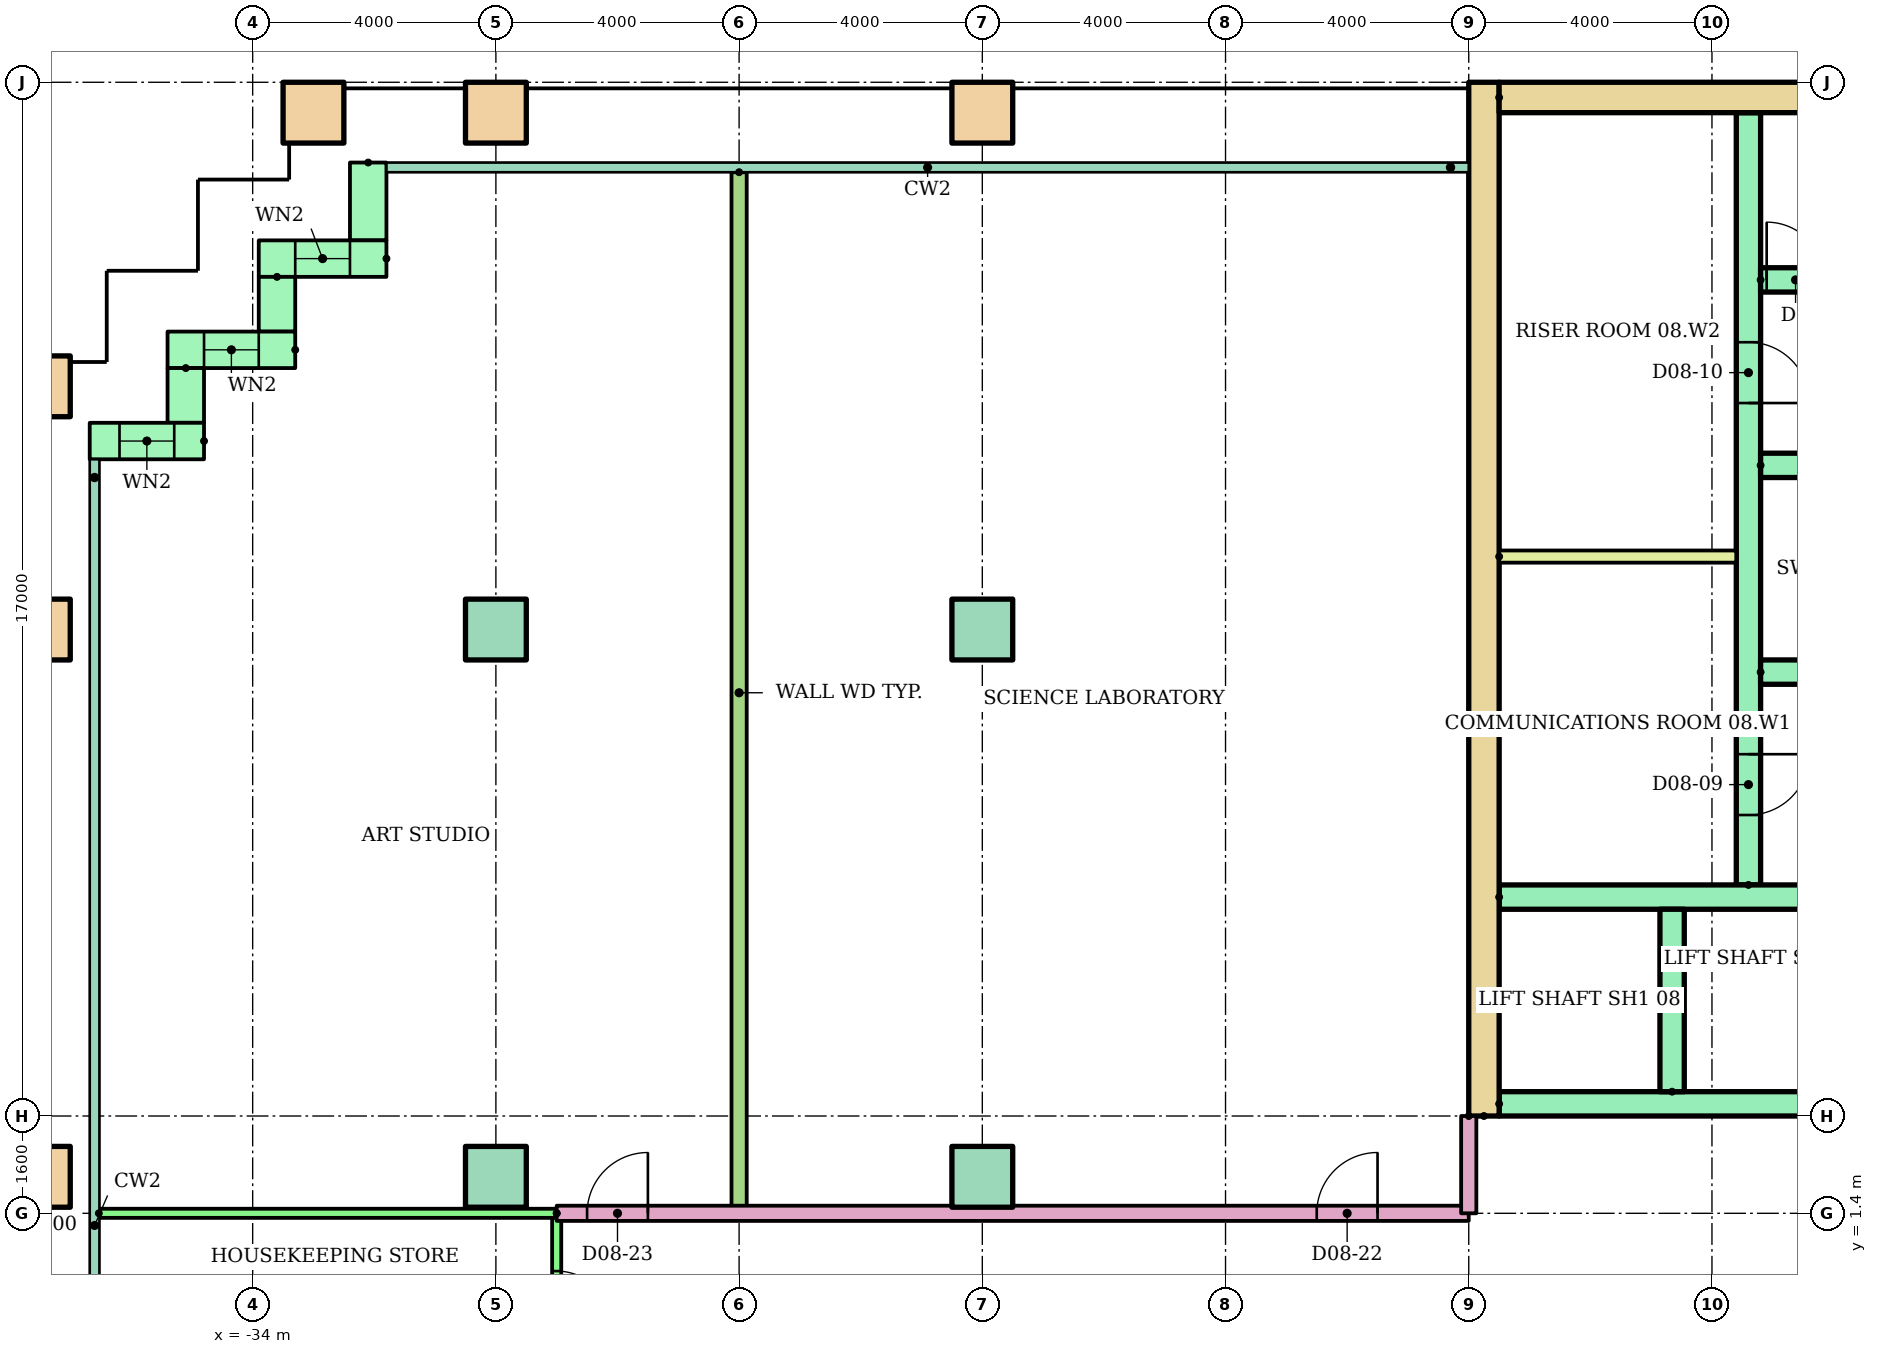
"""IFC4 building model, lengths in metres.
Left out: names, types, materials, properties, quantities, classifications, styles, units other than length and angle.
Written with IfcOpenShell. Run it as: python <this file> out.ifc"""

import sys

from ifc_helpers import new_model, si_unit, direction, frame, frame_2d, origin, origin_2d, place, context, subcontext, project, spatial, rectangle, hollow_rectangle, extrude, element, fill, save


model = new_model("IFC4")
c1 = context("Model", 3, precision=1e-05, world=origin(), true_north=direction((0.0, 1.0)))
c2 = subcontext(c1, "Body", "Model", "MODEL_VIEW")
j1 = project(units=[si_unit("LENGTHUNIT", "METRE"), si_unit("PLANEANGLEUNIT", "RADIAN")], contexts=[c1])
p1 = place(None, origin())
s1 = spatial("IfcSite", under=j1, at=p1, CompositionType="ELEMENT")
p2 = place(p1, origin())
s2 = spatial("IfcBuilding", under=s1, at=p2, CompositionType="ELEMENT")
p3 = place(p2, frame((0.0, 0.0, 33.8)))
s3 = spatial("IfcBuildingStorey", under=s2, at=p3, CompositionType="ELEMENT", Elevation=33.8)
p4 = place(p3, frame((-37.5, 2.0, 0.0)))
e1 = element("IfcColumn", 1, at=p4, inside=s3, PredefinedType="COLUMN", context=c2, shape_type="SweptSolid", body=[
    extrude(hollow_rectangle(XDim=1.0, YDim=1.0, WallThickness=0.05, at=origin_2d()), origin(), (0.0, 0.0, 1.0), 3.9),
])
for number, where in (
    (2, (-30.0, 2.0, 0.0)),
    (3, (-22.0, 2.0, 0.0)),
):
    element("IfcColumn", number, at=place(p3, frame(where)), inside=s3, PredefinedType="COLUMN", context=c2, shape_type="SweptSolid", body=[
        extrude(rectangle(XDim=1.0, YDim=1.0, at=origin_2d()), origin(), (0.0, 0.0, 1.0), 3.9),
    ])
p5 = place(p3, frame((-37.5, 11.0, 0.0)))
e4 = element("IfcColumn", 4, at=p5, inside=s3, PredefinedType="COLUMN", context=c2, shape_type="SweptSolid", body=[
    extrude(hollow_rectangle(XDim=1.0, YDim=1.0, WallThickness=0.05, at=origin_2d()), origin(), (0.0, 0.0, 1.0), 3.9),
])
for number, where in (
    (5, (-30.0, 11.0, 0.0)),
    (6, (-22.0, 11.0, 0.0)),
):
    element("IfcColumn", number, at=place(p3, frame(where)), inside=s3, PredefinedType="COLUMN", context=c2, shape_type="SweptSolid", body=[
        extrude(rectangle(XDim=1.0, YDim=1.0, at=origin_2d()), origin(), (0.0, 0.0, 1.0), 3.9),
    ])
for number, where in (
    (7, (-37.5, 15.0, 0.0)),
    (8, (-33.0, 19.5, 0.0)),
    (9, (-30.0, 19.5, 0.0)),
    (10, (-22.0, 19.5, 0.0)),
):
    element("IfcColumn", number, at=place(p3, frame(where)), inside=s3, PredefinedType="COLUMN", context=c2, shape_type="SweptSolid", body=[
        extrude(hollow_rectangle(XDim=1.0, YDim=1.0, WallThickness=0.05, at=origin_2d()), origin(), (0.0, 0.0, 1.0), 3.9),
    ])
p6 = place(p3, frame((-32.1, 18.68, 0.0), z_axis=(0.0, 0.0, 1.0), x_axis=(0.0, -1.0, 0.0)))
e11 = element("IfcWall", 11, at=p6, inside=s3, PredefinedType="STANDARD", context=c2, shape_type="SweptSolid", body=[
    extrude(rectangle(XDim=1.28, YDim=0.6, at=frame_2d((0.64, 0.0))), origin(), (0.0, 0.0, 1.0), 3.6),
])
p7 = place(p3, frame((-31.8, 17.1, 0.0), z_axis=(0.0, 0.0, 1.0), x_axis=(-1.0, 0.0, 0.0)))
e12 = element("IfcWall", 12, at=p7, inside=s3, PredefinedType="STANDARD", context=c2, shape_type="SweptSolid", body=[
    extrude(rectangle(XDim=2.1, YDim=0.6, at=frame_2d((1.05, 0.0))), origin(), (0.0, 0.0, 1.0), 3.6),
])
p8 = place(p7, frame((0.6, 0.0, 0.9)))
e13 = element("IfcOpeningElement", 13, at=p8, cuts=e12, PredefinedType="OPENING", context=c2, shape_type="SweptSolid", body=[
    extrude(rectangle(XDim=0.9, YDim=1.8, at=frame_2d((0.45, 0.9))), frame((0.0, 0.31, 0.0), z_axis=(0.0, -1.0, 0.0), x_axis=(1.0, 0.0, 0.0)), (0.0, 0.0, 1.0), 0.62),
])
p9 = place(p3, frame((-33.6, 16.8, 0.0), z_axis=(0.0, 0.0, 1.0), x_axis=(0.0, -1.0, 0.0)))
e14 = element("IfcWall", 14, at=p9, inside=s3, PredefinedType="STANDARD", context=c2, shape_type="SweptSolid", body=[
    extrude(rectangle(XDim=0.9, YDim=0.6, at=frame_2d((0.45, 0.0))), origin(), (0.0, 0.0, 1.0), 3.6),
])
p10 = place(p3, frame((-33.3, 15.6, 0.0), z_axis=(0.0, 0.0, 1.0), x_axis=(-1.0, 0.0, 0.0)))
e15 = element("IfcWall", 15, at=p10, inside=s3, PredefinedType="STANDARD", context=c2, shape_type="SweptSolid", body=[
    extrude(rectangle(XDim=2.1, YDim=0.6, at=frame_2d((1.05, 0.0))), origin(), (0.0, 0.0, 1.0), 3.6),
])
p11 = place(p10, frame((0.6, 0.0, 0.9)))
e16 = element("IfcOpeningElement", 16, at=p11, cuts=e15, PredefinedType="OPENING", context=c2, shape_type="SweptSolid", body=[
    extrude(rectangle(XDim=0.9, YDim=1.8, at=frame_2d((0.45, 0.9))), frame((0.0, 0.31, 0.0), z_axis=(0.0, -1.0, 0.0), x_axis=(1.0, 0.0, 0.0)), (0.0, 0.0, 1.0), 0.62),
])
p12 = place(p3, frame((-35.1, 15.3, 0.0), z_axis=(0.0, 0.0, 1.0), x_axis=(0.0, -1.0, 0.0)))
e17 = element("IfcWall", 17, at=p12, inside=s3, PredefinedType="STANDARD", context=c2, shape_type="SweptSolid", body=[
    extrude(rectangle(XDim=0.9, YDim=0.6, at=frame_2d((0.45, 0.0))), origin(), (0.0, 0.0, 1.0), 3.6),
])
p13 = place(p3, frame((-34.8, 14.1, 0.0), z_axis=(0.0, 0.0, 1.0), x_axis=(-1.0, 0.0, 0.0)))
e18 = element("IfcWall", 18, at=p13, inside=s3, PredefinedType="STANDARD", context=c2, shape_type="SweptSolid", body=[
    extrude(rectangle(XDim=1.88, YDim=0.6, at=frame_2d((0.94, 0.0))), origin(), (0.0, 0.0, 1.0), 3.6),
])
p14 = place(p13, frame((0.49, 0.0, 0.9)))
e19 = element("IfcOpeningElement", 19, at=p14, cuts=e18, PredefinedType="OPENING", context=c2, shape_type="SweptSolid", body=[
    extrude(rectangle(XDim=0.9, YDim=1.8, at=frame_2d((0.45, 0.9))), frame((0.0, 0.31, 0.0), z_axis=(0.0, -1.0, 0.0), x_axis=(1.0, 0.0, 0.0)), (0.0, 0.0, 1.0), 0.62),
])
p15 = place(p3, frame((-13.75, 3.0, 0.0), z_axis=(0.0, 0.0, 1.0), x_axis=(0.0, 1.0, 0.0)))
e20 = element("IfcWall", 20, at=p15, inside=s3, PredefinedType="SHEAR", context=c2, shape_type="SweptSolid", body=[
    extrude(rectangle(XDim=17.0, YDim=0.5, at=frame_2d((8.5, 0.0))), origin(), (0.0, 0.0, 1.0), 3.6),
])
p16 = place(p3, frame((-13.5, 19.75, 0.0)))
e21 = element("IfcWall", 21, at=p16, inside=s3, PredefinedType="SHEAR", context=c2, shape_type="SweptSolid", body=[
    extrude(rectangle(XDim=27.0, YDim=0.5, at=frame_2d((13.5, 0.0))), origin(), (0.0, 0.0, 1.0), 3.6),
])
p17 = place(p3, frame((-9.4, 6.8, 0.0), z_axis=(0.0, 0.0, 1.0), x_axis=(0.0, 1.0, 0.0)))
e22 = element("IfcWall", 22, at=p17, inside=s3, PredefinedType="SHEAR", context=c2, shape_type="SweptSolid", body=[
    extrude(rectangle(XDim=12.7, YDim=0.4, at=frame_2d((6.35, 0.0))), origin(), (0.0, 0.0, 1.0), 3.6),
])
p18 = place(p17, frame((1.15, 0.0, 0.0)))
e23 = element("IfcOpeningElement", 23, at=p18, cuts=e22, PredefinedType="OPENING", context=c2, shape_type="SweptSolid", body=[
    extrude(rectangle(XDim=1.0, YDim=2.1, at=frame_2d((0.5, 1.05))), frame((0.0, 0.21, 0.0), z_axis=(0.0, -1.0, 0.0), x_axis=(1.0, 0.0, 0.0)), (0.0, 0.0, 1.0), 0.42),
])
p19 = place(p17, frame((7.925, 0.0, 0.0)))
e24 = element("IfcOpeningElement", 24, at=p19, cuts=e22, PredefinedType="OPENING", context=c2, shape_type="SweptSolid", body=[
    extrude(rectangle(XDim=1.0, YDim=2.1, at=frame_2d((0.5, 1.05))), frame((0.0, 0.21, 0.0), z_axis=(0.0, -1.0, 0.0), x_axis=(1.0, 0.0, 0.0)), (0.0, 0.0, 1.0), 0.42),
])
p20 = place(p3, frame((-13.5, 3.2, 0.0)))
e25 = element("IfcWall", 25, at=p20, inside=s3, PredefinedType="SHEAR", context=c2, shape_type="SweptSolid", body=[
    extrude(rectangle(XDim=27.0, YDim=0.4, at=frame_2d((13.5, 0.0))), origin(), (0.0, 0.0, 1.0), 3.6),
])
p21 = place(p20, frame((6.861, 0.0, 0.0)))
e26 = element("IfcOpeningElement", 26, at=p21, cuts=e25, PredefinedType="OPENING", context=c2, shape_type="SweptSolid", body=[
    extrude(rectangle(XDim=1.1, YDim=2.1, at=frame_2d((0.55, 1.05))), frame((0.0, 0.21, 0.0), z_axis=(0.0, -1.0, 0.0), x_axis=(1.0, 0.0, 0.0)), (0.0, 0.0, 1.0), 0.42),
])
p22 = place(p20, frame((9.906, 0.0, 0.0)))
e27 = element("IfcOpeningElement", 27, at=p22, cuts=e25, PredefinedType="OPENING", context=c2, shape_type="SweptSolid", body=[
    extrude(rectangle(XDim=1.1, YDim=2.1, at=frame_2d((0.55, 1.05))), frame((0.0, 0.21, 0.0), z_axis=(0.0, -1.0, 0.0), x_axis=(1.0, 0.0, 0.0)), (0.0, 0.0, 1.0), 0.42),
])
p23 = place(p20, frame((15.994, 0.0, 0.0)))
e28 = element("IfcOpeningElement", 28, at=p23, cuts=e25, PredefinedType="OPENING", context=c2, shape_type="SweptSolid", body=[
    extrude(rectangle(XDim=1.1, YDim=2.1, at=frame_2d((0.55, 1.05))), frame((0.0, 0.21, 0.0), z_axis=(0.0, -1.0, 0.0), x_axis=(1.0, 0.0, 0.0)), (0.0, 0.0, 1.0), 0.42),
])
p24 = place(p20, frame((19.039, 0.0, 0.0)))
e29 = element("IfcOpeningElement", 29, at=p24, cuts=e25, PredefinedType="OPENING", context=c2, shape_type="SweptSolid", body=[
    extrude(rectangle(XDim=1.1, YDim=2.1, at=frame_2d((0.55, 1.05))), frame((0.0, 0.21, 0.0), z_axis=(0.0, -1.0, 0.0), x_axis=(1.0, 0.0, 0.0)), (0.0, 0.0, 1.0), 0.42),
])
p25 = place(p20, frame((12.6, 0.0, 0.0)))
e30 = element("IfcOpeningElement", 30, at=p25, cuts=e25, PredefinedType="OPENING", context=c2, shape_type="SweptSolid", body=[
    extrude(rectangle(XDim=1.8, YDim=2.1, at=frame_2d((0.9, 1.05))), frame((0.0, 0.21, 0.0), z_axis=(0.0, -1.0, 0.0), x_axis=(1.0, 0.0, 0.0)), (0.0, 0.0, 1.0), 0.42),
])
p26 = place(p3, frame((-13.5, 6.6, 0.0)))
e31 = element("IfcWall", 31, at=p26, inside=s3, PredefinedType="SHEAR", context=c2, shape_type="SweptSolid", body=[
    extrude(rectangle(XDim=11.978, YDim=0.4, at=frame_2d((5.989, 0.0))), origin(), (0.0, 0.0, 1.0), 3.6),
])
p27 = place(p3, frame((-10.656, 3.4, 0.0), z_axis=(0.0, 0.0, 1.0), x_axis=(0.0, 1.0, 0.0)))
e32 = element("IfcWall", 32, at=p27, inside=s3, PredefinedType="SHEAR", context=c2, shape_type="SweptSolid", body=[
    extrude(rectangle(XDim=3.0, YDim=0.4, at=frame_2d((1.5, 0.0))), origin(), (0.0, 0.0, 1.0), 3.6),
])
p28 = place(p3, frame((-9.2, 10.3, 0.0)))
e33 = element("IfcWall", 33, at=p28, inside=s3, PredefinedType="SHEAR", context=c2, shape_type="SweptSolid", body=[
    extrude(rectangle(XDim=8.0, YDim=0.4, at=frame_2d((4.0, 0.0))), origin(), (0.0, 0.0, 1.0), 3.6),
])
p29 = place(p28, frame((2.033, 0.0, 0.0)))
e34 = element("IfcOpeningElement", 34, at=p29, cuts=e33, PredefinedType="OPENING", context=c2, shape_type="SweptSolid", body=[
    extrude(rectangle(XDim=1.0, YDim=2.1, at=frame_2d((0.5, 1.05))), frame((0.0, 0.21, 0.0), z_axis=(0.0, -1.0, 0.0), x_axis=(1.0, 0.0, 0.0)), (0.0, 0.0, 1.0), 0.42),
])
p30 = place(p28, frame((6.133, 0.0, 0.0)))
e35 = element("IfcOpeningElement", 35, at=p30, cuts=e33, PredefinedType="OPENING", context=c2, shape_type="SweptSolid", body=[
    extrude(rectangle(XDim=1.0, YDim=2.1, at=frame_2d((0.5, 1.05))), frame((0.0, 0.21, 0.0), z_axis=(0.0, -1.0, 0.0), x_axis=(1.0, 0.0, 0.0)), (0.0, 0.0, 1.0), 0.42),
])
p31 = place(p3, frame((-9.2, 13.7, 0.0)))
e36 = element("IfcWall", 36, at=p31, inside=s3, PredefinedType="SHEAR", context=c2, shape_type="SweptSolid", body=[
    extrude(rectangle(XDim=8.0, YDim=0.4, at=frame_2d((4.0, 0.0))), origin(), (0.0, 0.0, 1.0), 3.6),
])
p32 = place(p3, frame((-9.2, 16.75, 0.0)))
e37 = element("IfcWall", 37, at=p32, inside=s3, PredefinedType="SHEAR", context=c2, shape_type="SweptSolid", body=[
    extrude(rectangle(XDim=18.4, YDim=0.4, at=frame_2d((9.2, 0.0))), origin(), (0.0, 0.0, 1.0), 3.6),
])
p33 = place(p32, frame((0.1, 0.0, 0.0)))
e38 = element("IfcOpeningElement", 38, at=p33, cuts=e37, PredefinedType="OPENING", context=c2, shape_type="SweptSolid", body=[
    extrude(rectangle(XDim=0.95, YDim=2.1, at=frame_2d((0.475, 1.05))), frame((0.0, 0.21, 0.0), z_axis=(0.0, -1.0, 0.0), x_axis=(1.0, 0.0, 0.0)), (0.0, 0.0, 1.0), 0.42),
])
p34 = place(p32, frame((6.1, 0.0, 0.0)))
e39 = element("IfcOpeningElement", 39, at=p34, cuts=e37, PredefinedType="OPENING", context=c2, shape_type="SweptSolid", body=[
    extrude(rectangle(XDim=0.95, YDim=2.1, at=frame_2d((0.475, 1.05))), frame((0.0, 0.21, 0.0), z_axis=(0.0, -1.0, 0.0), x_axis=(1.0, 0.0, 0.0)), (0.0, 0.0, 1.0), 0.42),
])
p35 = place(p32, frame((12.1, 0.0, 0.0)))
e40 = element("IfcOpeningElement", 40, at=p35, cuts=e37, PredefinedType="OPENING", context=c2, shape_type="SweptSolid", body=[
    extrude(rectangle(XDim=0.95, YDim=2.1, at=frame_2d((0.475, 1.05))), frame((0.0, 0.21, 0.0), z_axis=(0.0, -1.0, 0.0), x_axis=(1.0, 0.0, 0.0)), (0.0, 0.0, 1.0), 0.42),
])
p36 = place(p3, frame((-13.5, 12.2, 0.0)))
e41 = element("IfcWall", 41, at=p36, inside=s3, PredefinedType="PARTITIONING", context=c2, shape_type="SweptSolid", body=[
    extrude(rectangle(XDim=3.9, YDim=0.2, at=frame_2d((1.95, 0.0))), origin(), (0.0, 0.0, 1.0), 3.6),
])
p37 = place(p3, frame((-29.0, 1.4, 0.0), z_axis=(0.0, 0.0, 1.0), x_axis=(0.0, -1.0, 0.0)))
e42 = element("IfcWall", 42, at=p37, inside=s3, PredefinedType="PARTITIONING", context=c2, shape_type="SweptSolid", body=[
    extrude(rectangle(XDim=2.8, YDim=0.15, at=frame_2d((1.4, 0.0))), origin(), (0.0, 0.0, 1.0), 3.1),
])
p38 = place(p37, frame((0.95, 0.0, 0.0)))
e43 = element("IfcOpeningElement", 43, at=p38, cuts=e42, PredefinedType="OPENING", context=c2, shape_type="SweptSolid", body=[
    extrude(rectangle(XDim=0.9, YDim=2.1, at=frame_2d((0.45, 1.05))), frame((0.0, 0.085, 0.0), z_axis=(0.0, -1.0, 0.0), x_axis=(1.0, 0.0, 0.0)), (0.0, 0.0, 1.0), 0.17),
])
p39 = place(p3, frame((-29.0, 1.4, 0.0)))
e44 = element("IfcWall", 44, at=p39, inside=s3, PredefinedType="PARTITIONING", context=c2, shape_type="SweptSolid", body=[
    extrude(rectangle(XDim=15.0, YDim=0.25, at=frame_2d((7.5, 0.0))), origin(), (0.0, 0.0, 1.0), 3.1),
])
p40 = place(p39, frame((12.5, 0.0, 0.0)))
e45 = element("IfcOpeningElement", 45, at=p40, cuts=e44, PredefinedType="OPENING", context=c2, shape_type="SweptSolid", body=[
    extrude(rectangle(XDim=1.0, YDim=2.1, at=frame_2d((0.5, 1.05))), frame((0.0, 0.135, 0.0), z_axis=(0.0, -1.0, 0.0), x_axis=(1.0, 0.0, 0.0)), (0.0, 0.0, 1.0), 0.27),
])
p41 = place(p39, frame((0.5, 0.0, 0.0)))
e46 = element("IfcOpeningElement", 46, at=p41, cuts=e44, PredefinedType="OPENING", context=c2, shape_type="SweptSolid", body=[
    extrude(rectangle(XDim=1.0, YDim=2.1, at=frame_2d((0.5, 1.05))), frame((0.0, 0.135, 0.0), z_axis=(0.0, -1.0, 0.0), x_axis=(1.0, 0.0, 0.0)), (0.0, 0.0, 1.0), 0.27),
])
p42 = place(p3, frame((-36.53, 1.4, 0.0)))
e47 = element("IfcWall", 47, at=p42, inside=s3, PredefinedType="PARTITIONING", context=c2, shape_type="SweptSolid", body=[
    extrude(rectangle(XDim=7.53, YDim=0.15, at=frame_2d((3.765, 0.0))), origin(), (0.0, 0.0, 1.0), 3.1),
])
p43 = place(p3, frame((-26.0, 18.521, 0.0), z_axis=(0.0, 0.0, 1.0), x_axis=(0.0, -1.0, 0.0)))
e48 = element("IfcWall", 48, at=p43, inside=s3, PredefinedType="PARTITIONING", context=c2, shape_type="SweptSolid", body=[
    extrude(rectangle(XDim=17.121, YDim=0.25, at=frame_2d((8.561, 0.0))), origin(), (0.0, 0.0, 1.0), 3.1),
])
p44 = place(p3, frame((-14.0, 3.0, 0.0), z_axis=(0.0, 0.0, 1.0), x_axis=(0.0, -1.0, 0.0)))
e49 = element("IfcWall", 49, at=p44, inside=s3, PredefinedType="PARTITIONING", context=c2, shape_type="SweptSolid", body=[
    extrude(rectangle(XDim=1.6, YDim=0.25, at=frame_2d((0.8, 0.0))), origin(), (0.0, 0.0, 1.0), 3.1),
])
p45 = place(p8, origin())
e50 = element("IfcWindow", 50, at=p45, inside=s3, PartitioningType="SINGLE_PANEL", PredefinedType="WINDOW", context=c2, shape_type="SweptSolid", body=[
    extrude(rectangle(XDim=0.9, YDim=1.8, at=frame_2d((0.45, 0.9))), frame((0.0, 0.03, 0.0), z_axis=(0.0, -1.0, 0.0), x_axis=(1.0, 0.0, 0.0)), (0.0, 0.0, 1.0), 0.06),
])
fill(e13, e50)
p46 = place(p11, origin())
e51 = element("IfcWindow", 51, at=p46, inside=s3, PartitioningType="SINGLE_PANEL", PredefinedType="WINDOW", context=c2, shape_type="SweptSolid", body=[
    extrude(rectangle(XDim=0.9, YDim=1.8, at=frame_2d((0.45, 0.9))), frame((0.0, 0.03, 0.0), z_axis=(0.0, -1.0, 0.0), x_axis=(1.0, 0.0, 0.0)), (0.0, 0.0, 1.0), 0.06),
])
fill(e16, e51)
p47 = place(p14, origin())
e52 = element("IfcWindow", 52, at=p47, inside=s3, PartitioningType="SINGLE_PANEL", PredefinedType="WINDOW", context=c2, shape_type="SweptSolid", body=[
    extrude(rectangle(XDim=0.9, YDim=1.8, at=frame_2d((0.45, 0.9))), frame((0.0, 0.03, 0.0), z_axis=(0.0, -1.0, 0.0), x_axis=(1.0, 0.0, 0.0)), (0.0, 0.0, 1.0), 0.06),
])
fill(e19, e52)
p48 = place(p33, origin())
e53 = element("IfcDoor", 53, at=p48, inside=s3, OperationType="SINGLE_SWING_LEFT", PredefinedType="DOOR", context=c2, shape_type="SweptSolid", body=[
    extrude(rectangle(XDim=0.95, YDim=2.1, at=frame_2d((0.475, 1.05))), frame((0.0, 0.025, 0.0), z_axis=(0.0, -1.0, 0.0), x_axis=(1.0, 0.0, 0.0)), (0.0, 0.0, 1.0), 0.05),
])
fill(e38, e53)
p49 = place(p18, frame((1.0, 0.0, 0.0), z_axis=(0.0, 0.0, 1.0), x_axis=(-1.0, 0.0, 0.0)))
e54 = element("IfcDoor", 54, at=p49, inside=s3, OperationType="SINGLE_SWING_RIGHT", PredefinedType="DOOR", context=c2, shape_type="SweptSolid", body=[
    extrude(rectangle(XDim=1.0, YDim=2.1, at=frame_2d((0.5, 1.05))), frame((0.0, 0.025, 0.0), z_axis=(0.0, -1.0, 0.0), x_axis=(1.0, 0.0, 0.0)), (0.0, 0.0, 1.0), 0.05),
])
fill(e23, e54)
p50 = place(p19, frame((1.0, 0.0, 0.0), z_axis=(0.0, 0.0, 1.0), x_axis=(-1.0, 0.0, 0.0)))
e55 = element("IfcDoor", 55, at=p50, inside=s3, OperationType="SINGLE_SWING_LEFT", PredefinedType="DOOR", context=c2, shape_type="SweptSolid", body=[
    extrude(rectangle(XDim=1.0, YDim=2.1, at=frame_2d((0.5, 1.05))), frame((0.0, 0.025, 0.0), z_axis=(0.0, -1.0, 0.0), x_axis=(1.0, 0.0, 0.0)), (0.0, 0.0, 1.0), 0.05),
])
fill(e24, e55)
p51 = place(p38, origin())
e56 = element("IfcDoor", 56, at=p51, inside=s3, OperationType="SINGLE_SWING_RIGHT", PredefinedType="DOOR", context=c2, shape_type="SweptSolid", body=[
    extrude(rectangle(XDim=0.9, YDim=2.1, at=frame_2d((0.45, 1.05))), frame((0.0, 0.025, 0.0), z_axis=(0.0, -1.0, 0.0), x_axis=(1.0, 0.0, 0.0)), (0.0, 0.0, 1.0), 0.05),
])
fill(e43, e56)
p52 = place(p40, origin())
e57 = element("IfcDoor", 57, at=p52, inside=s3, OperationType="SINGLE_SWING_RIGHT", PredefinedType="DOOR", context=c2, shape_type="SweptSolid", body=[
    extrude(rectangle(XDim=1.0, YDim=2.1, at=frame_2d((0.5, 1.05))), frame((0.0, 0.025, 0.0), z_axis=(0.0, -1.0, 0.0), x_axis=(1.0, 0.0, 0.0)), (0.0, 0.0, 1.0), 0.05),
])
fill(e45, e57)
p53 = place(p41, origin())
e58 = element("IfcDoor", 58, at=p53, inside=s3, OperationType="SINGLE_SWING_RIGHT", PredefinedType="DOOR", context=c2, shape_type="SweptSolid", body=[
    extrude(rectangle(XDim=1.0, YDim=2.1, at=frame_2d((0.5, 1.05))), frame((0.0, 0.025, 0.0), z_axis=(0.0, -1.0, 0.0), x_axis=(1.0, 0.0, 0.0)), (0.0, 0.0, 1.0), 0.05),
])
fill(e46, e58)
save(model, sys.argv[1])
